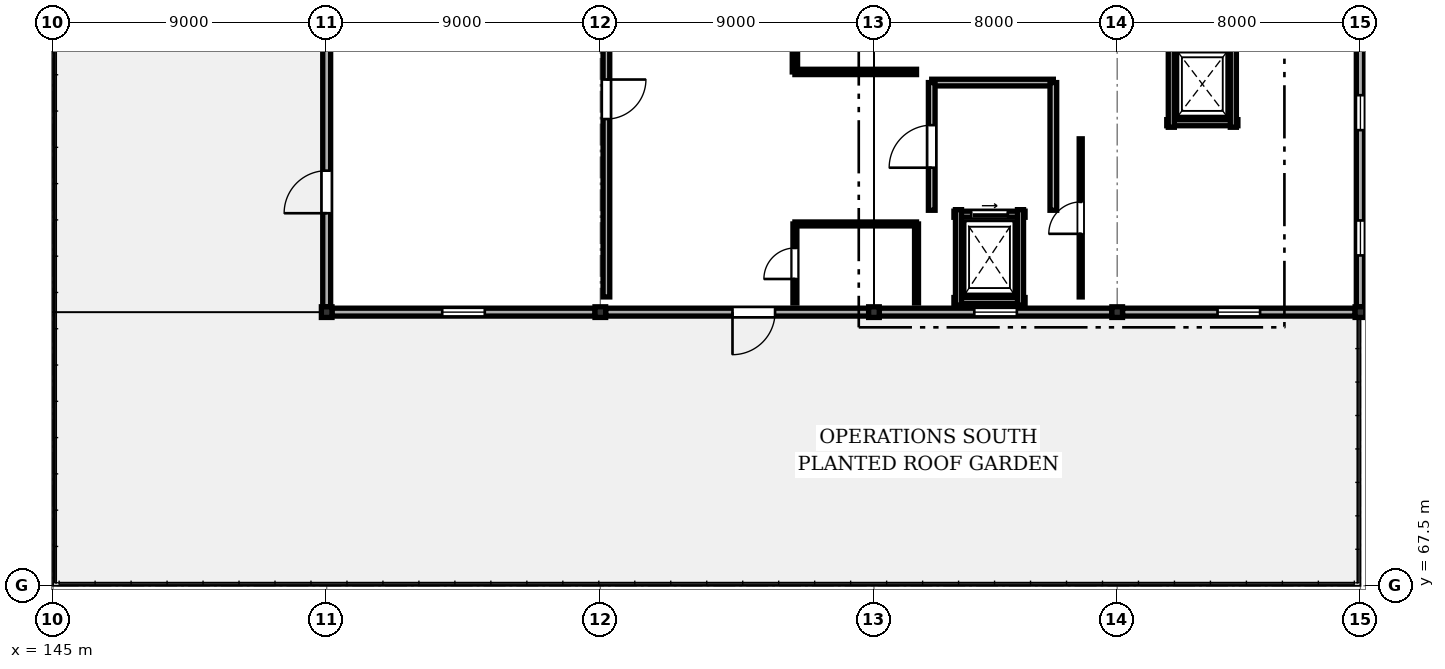
"""IFC4 building model, lengths in metres.
Left out: names, types, materials, properties, quantities, classifications, styles, units other than length and angle.
Written with IfcOpenShell. Run it as: python <this file> out.ifc"""

import sys

from ifc_helpers import new_model, si_unit, direction, frame, frame_2d, origin, origin_2d, place, context, subcontext, project, spatial, rectangle, i_section, extrude, element, fill, save


model = new_model("IFC4")
c1 = context("Model", 3, precision=1e-05, world=origin(), true_north=direction((0.0, 1.0)))
c2 = subcontext(c1, "Body", "Model", "MODEL_VIEW")
j1 = project(units=[si_unit("LENGTHUNIT", "METRE"), si_unit("PLANEANGLEUNIT", "RADIAN")], contexts=[c1])
p1 = place(None, origin())
s1 = spatial("IfcSite", under=j1, at=p1, CompositionType="ELEMENT")
p2 = place(p1, origin())
s2 = spatial("IfcBuilding", under=s1, at=p2, CompositionType="ELEMENT")
p3 = place(p2, frame((0.0, 0.0, 17.6)))
s3 = spatial("IfcBuildingStorey", under=s2, at=p3, CompositionType="ELEMENT", Elevation=17.6)
for number, where, z_axis, x_axis in (
    (1, (154.0, 76.5, 0.0), (0.0, 0.0, 1.0), (1.0, 0.0, 0.0)),
    (2, (163.0, 76.5, 0.0), (0.0, 0.0, 1.0), (1.0, 0.0, 0.0)),
    (3, (172.0, 76.5, 0.0), (0.0, 0.0, 1.0), (1.0, 0.0, 0.0)),
    (4, (180.0, 76.5, 0.0), (0.0, 0.0, 1.0), (1.0, 0.0, 0.0)),
    (5, (188.0, 76.5, 0.0), (0.0, 0.0, 1.0), (1.0, 0.0, 0.0)),
):
    element("IfcColumn", number, at=place(p3, frame(where, z_axis=z_axis, x_axis=x_axis)), inside=s3, PredefinedType="COLUMN", context=c2, shape_type="SweptSolid", body=[
        extrude(i_section(OverallWidth=0.35, OverallDepth=0.35, WebThickness=0.012, FlangeThickness=0.019, FilletRadius=0.02, at=origin_2d()), origin(), (0.0, 0.0, 1.0), 3.2),
    ])
p4 = place(p3, frame((188.0, 85.325, 0.0), z_axis=(0.0, 0.0, 1.0), x_axis=(0.0, -1.0, 0.0)))
e6 = element("IfcWall", 6, at=p4, inside=s3, PredefinedType="SOLIDWALL", context=c2, shape_type="SweptSolid", body=[
    extrude(rectangle(XDim=8.65, YDim=0.27, at=frame_2d((4.325, 0.0))), origin(), (0.0, 0.0, 1.0), 2.495),
])
p5 = place(p4, frame((1.69, 0.0, 0.9)))
e7 = element("IfcOpeningElement", 7, at=p5, cuts=e6, PredefinedType="OPENING", context=c2, shape_type="SweptSolid", body=[
    extrude(rectangle(XDim=1.15, YDim=1.45, at=frame_2d((0.575, 0.725))), frame((0.0, 0.145, 0.0), z_axis=(0.0, -1.0, 0.0), x_axis=(1.0, 0.0, 0.0)), (0.0, 0.0, 1.0), 0.29),
])
p6 = place(p4, frame((5.81, 0.0, 0.9)))
e8 = element("IfcOpeningElement", 8, at=p6, cuts=e6, PredefinedType="OPENING", context=c2, shape_type="SweptSolid", body=[
    extrude(rectangle(XDim=1.15, YDim=1.45, at=frame_2d((0.575, 0.725))), frame((0.0, 0.145, 0.0), z_axis=(0.0, -1.0, 0.0), x_axis=(1.0, 0.0, 0.0)), (0.0, 0.0, 1.0), 0.29),
])
p7 = place(p3, frame((187.825, 76.5, 0.0), z_axis=(0.0, 0.0, 1.0), x_axis=(-1.0, 0.0, 0.0)))
e9 = element("IfcWall", 9, at=p7, inside=s3, PredefinedType="SOLIDWALL", context=c2, shape_type="SweptSolid", body=[
    extrude(rectangle(XDim=7.65, YDim=0.26, at=frame_2d((3.825, 0.0))), origin(), (0.0, 0.0, 1.0), 2.495),
])
p8 = place(p7, frame((3.125, 0.0, 0.75)))
e10 = element("IfcOpeningElement", 10, at=p8, cuts=e9, PredefinedType="OPENING", context=c2, shape_type="SweptSolid", body=[
    extrude(rectangle(XDim=1.4, YDim=1.55, at=frame_2d((0.7, 0.775))), frame((0.0, 0.14, 0.0), z_axis=(0.0, -1.0, 0.0), x_axis=(1.0, 0.0, 0.0)), (0.0, 0.0, 1.0), 0.28),
])
p9 = place(p3, frame((179.825, 76.5, 0.0), z_axis=(0.0, 0.0, 1.0), x_axis=(-1.0, 0.0, 0.0)))
e11 = element("IfcWall", 11, at=p9, inside=s3, PredefinedType="SOLIDWALL", context=c2, shape_type="SweptSolid", body=[
    extrude(rectangle(XDim=7.65, YDim=0.26, at=frame_2d((3.825, 0.0))), origin(), (0.0, 0.0, 1.0), 2.515),
])
p10 = place(p9, frame((3.125, 0.0, 0.75)))
e12 = element("IfcOpeningElement", 12, at=p10, cuts=e11, PredefinedType="OPENING", context=c2, shape_type="SweptSolid", body=[
    extrude(rectangle(XDim=1.4, YDim=1.55, at=frame_2d((0.7, 0.775))), frame((0.0, 0.14, 0.0), z_axis=(0.0, -1.0, 0.0), x_axis=(1.0, 0.0, 0.0)), (0.0, 0.0, 1.0), 0.28),
])
p11 = place(p3, frame((171.825, 76.5, 0.0), z_axis=(0.0, 0.0, 1.0), x_axis=(-1.0, 0.0, 0.0)))
e13 = element("IfcWall", 13, at=p11, inside=s3, PredefinedType="SOLIDWALL", context=c2, shape_type="SweptSolid", body=[
    extrude(rectangle(XDim=8.65, YDim=0.26, at=frame_2d((4.325, 0.0))), origin(), (0.0, 0.0, 1.0), 2.505),
])
p12 = place(p11, frame((3.078, 0.0, 0.0)))
e14 = element("IfcOpeningElement", 14, at=p12, cuts=e13, PredefinedType="OPENING", context=c2, shape_type="SweptSolid", body=[
    extrude(rectangle(XDim=1.4, YDim=2.25, at=frame_2d((0.7, 1.125))), frame((0.0, 0.14, 0.0), z_axis=(0.0, -1.0, 0.0), x_axis=(1.0, 0.0, 0.0)), (0.0, 0.0, 1.0), 0.28),
])
p13 = place(p3, frame((162.825, 76.5, 0.0), z_axis=(0.0, 0.0, 1.0), x_axis=(-1.0, 0.0, 0.0)))
e15 = element("IfcWall", 15, at=p13, inside=s3, PredefinedType="SOLIDWALL", context=c2, shape_type="SweptSolid", body=[
    extrude(rectangle(XDim=8.65, YDim=0.26, at=frame_2d((4.325, 0.0))), origin(), (0.0, 0.0, 1.0), 2.505),
])
p14 = place(p13, frame((3.625, 0.0, 0.75)))
e16 = element("IfcOpeningElement", 16, at=p14, cuts=e15, PredefinedType="OPENING", context=c2, shape_type="SweptSolid", body=[
    extrude(rectangle(XDim=1.4, YDim=1.55, at=frame_2d((0.7, 0.775))), frame((0.0, 0.14, 0.0), z_axis=(0.0, -1.0, 0.0), x_axis=(1.0, 0.0, 0.0)), (0.0, 0.0, 1.0), 0.28),
])
p15 = place(p3, frame((154.0, 76.675, 0.0), z_axis=(0.0, 0.0, 1.0), x_axis=(0.0, 1.0, 0.0)))
e17 = element("IfcWall", 17, at=p15, inside=s3, PredefinedType="SOLIDWALL", context=c2, shape_type="SweptSolid", body=[
    extrude(rectangle(XDim=8.65, YDim=0.26, at=frame_2d((4.325, 0.0))), origin(), (0.0, 0.0, 1.0), 2.505),
])
p16 = place(p15, frame((3.078, 0.0, 0.0)))
e18 = element("IfcOpeningElement", 18, at=p16, cuts=e17, PredefinedType="OPENING", context=c2, shape_type="SweptSolid", body=[
    extrude(rectangle(XDim=1.4, YDim=2.25, at=frame_2d((0.7, 1.125))), frame((0.0, 0.14, 0.0), z_axis=(0.0, -1.0, 0.0), x_axis=(1.0, 0.0, 0.0)), (0.0, 0.0, 1.0), 0.28),
])
p17 = place(p3, frame((174.63, 76.88, 0.0), z_axis=(0.0, 0.0, 1.0), x_axis=(1.0, 0.0, 0.0)))
e19 = element("IfcWall", 19, at=p17, inside=s3, PredefinedType="SOLIDWALL", context=c2, shape_type="SweptSolid", body=[
    extrude(rectangle(XDim=2.34, YDim=0.2, at=frame_2d((1.17, 0.0))), origin(), (0.0, 0.0, 1.0), 2.515),
])
p18 = place(p3, frame((176.97, 79.72, 0.0), z_axis=(0.0, 0.0, 1.0), x_axis=(-1.0, 0.0, 0.0)))
e20 = element("IfcWall", 20, at=p18, inside=s3, PredefinedType="SOLIDWALL", context=c2, shape_type="SweptSolid", body=[
    extrude(rectangle(XDim=2.34, YDim=0.2, at=frame_2d((1.17, 0.0))), origin(), (0.0, 0.0, 1.0), 2.955),
])
p19 = place(p18, frame((0.57, 0.0, 0.0)))
e21 = element("IfcOpeningElement", 21, at=p19, cuts=e20, PredefinedType="OPENING", context=c2, shape_type="SweptSolid", body=[
    extrude(rectangle(XDim=1.2, YDim=2.15, at=frame_2d((0.6, 1.075))), frame((0.0, 0.11, 0.0), z_axis=(0.0, -1.0, 0.0), x_axis=(1.0, 0.0, 0.0)), (0.0, 0.0, 1.0), 0.22),
])
for number, where, z_axis, x_axis in (
    (22, (174.78, 79.87, 0.0), (0.0, 0.0, 1.0), (0.0, -1.0, 0.0)),
    (23, (176.82, 76.73, 0.0), (0.0, 0.0, 1.0), (0.0, 1.0, 0.0)),
):
    element("IfcWall", number, at=place(p3, frame(where, z_axis=z_axis, x_axis=x_axis)), inside=s3, PredefinedType="SOLIDWALL", context=c2, shape_type="SweptSolid", body=[
        extrude(rectangle(XDim=3.14, YDim=0.2, at=frame_2d((1.57, 0.0))), origin(), (0.0, 0.0, 1.0), 2.515),
    ])
p20 = place(p3, frame((181.63, 82.73, 0.0), z_axis=(0.0, 0.0, 1.0), x_axis=(1.0, 0.0, 0.0)))
e24 = element("IfcWall", 24, at=p20, inside=s3, PredefinedType="SOLIDWALL", context=c2, shape_type="SweptSolid", body=[
    extrude(rectangle(XDim=2.34, YDim=0.2, at=frame_2d((1.17, 0.0))), origin(), (0.0, 0.0, 1.0), 2.955),
])
for number, where, z_axis, x_axis in (
    (25, (181.78, 85.42, 0.0), (0.0, 0.0, 1.0), (0.0, -1.0, 0.0)),
    (26, (183.82, 82.58, 0.0), (0.0, 0.0, 1.0), (0.0, 1.0, 0.0)),
):
    element("IfcWall", number, at=place(p3, frame(where, z_axis=z_axis, x_axis=x_axis)), inside=s3, PredefinedType="SOLIDWALL", context=c2, shape_type="SweptSolid", body=[
        extrude(rectangle(XDim=2.84, YDim=0.2, at=frame_2d((1.42, 0.0))), origin(), (0.0, 0.0, 1.0), 2.515),
    ])
p21 = place(p3, frame((163.2, 90.0, 0.0), z_axis=(0.0, 0.0, 1.0), x_axis=(0.0, -1.0, 0.0)))
e27 = element("IfcWall", 27, at=p21, inside=s3, PredefinedType="SOLIDWALL", context=c2, shape_type="SweptSolid", body=[
    extrude(rectangle(XDim=13.0, YDim=0.22, at=frame_2d((6.5, 0.0))), origin(), (0.0, 0.0, 1.0), 2.505),
])
p22 = place(p21, frame((5.85, 0.0, 0.0)))
e28 = element("IfcOpeningElement", 28, at=p22, cuts=e27, PredefinedType="OPENING", context=c2, shape_type="SweptSolid", body=[
    extrude(rectangle(XDim=1.3, YDim=2.1, at=frame_2d((0.65, 1.05))), frame((0.0, 0.12, 0.0), z_axis=(0.0, -1.0, 0.0), x_axis=(1.0, 0.0, 0.0)), (0.0, 0.0, 1.0), 0.24),
])
p23 = place(p3, frame((173.4, 84.4, 0.0), z_axis=(0.0, 0.0, 1.0), x_axis=(-1.0, 0.0, 0.0)))
e29 = element("IfcWall", 29, at=p23, inside=s3, PredefinedType="PARTITIONING", context=c2, shape_type="SweptSolid", body=[
    extrude(rectangle(XDim=4.0, YDim=0.175, at=frame_2d((2.0, 0.0))), origin(), (0.0, 0.0, 1.0), 2.565),
])
p24 = place(p3, frame((169.4, 84.4, 0.0), z_axis=(0.0, 0.0, 1.0), x_axis=(0.0, 1.0, 0.0)))
e30 = element("IfcWall", 30, at=p24, inside=s3, PredefinedType="PARTITIONING", context=c2, shape_type="SweptSolid", body=[
    extrude(rectangle(XDim=11.2, YDim=0.175, at=frame_2d((5.6, 0.0))), origin(), (0.0, 0.0, 1.0), 2.515),
])
p25 = place(p24, frame((5.075, 0.0, 0.0)))
e31 = element("IfcOpeningElement", 31, at=p25, cuts=e30, PredefinedType="OPENING", context=c2, shape_type="SweptSolid", body=[
    extrude(rectangle(XDim=1.05, YDim=2.1, at=frame_2d((0.525, 1.05))), frame((0.0, 0.097, 0.0), z_axis=(0.0, -1.0, 0.0), x_axis=(1.0, 0.0, 0.0)), (0.0, 0.0, 1.0), 0.195),
])
p26 = place(p3, frame((169.4, 79.4, 0.0), z_axis=(0.0, 0.0, 1.0), x_axis=(1.0, 0.0, 0.0)))
e32 = element("IfcWall", 32, at=p26, inside=s3, PredefinedType="PARTITIONING", context=c2, shape_type="SweptSolid", body=[
    extrude(rectangle(XDim=4.0, YDim=0.13, at=frame_2d((2.0, 0.0))), origin(), (0.0, 0.0, 1.0), 2.565),
])
p27 = place(p3, frame((169.4, 76.8, 0.0), z_axis=(0.0, 0.0, 1.0), x_axis=(0.0, 1.0, 0.0)))
e33 = element("IfcWall", 33, at=p27, inside=s3, PredefinedType="PARTITIONING", context=c2, shape_type="SweptSolid", body=[
    extrude(rectangle(XDim=2.6, YDim=0.13, at=frame_2d((1.3, 0.0))), origin(), (0.0, 0.0, 1.0), 2.515),
])
p28 = place(p27, frame((0.79, 0.0, 0.0)))
e34 = element("IfcOpeningElement", 34, at=p28, cuts=e33, PredefinedType="OPENING", context=c2, shape_type="SweptSolid", body=[
    extrude(rectangle(XDim=1.02, YDim=2.05, at=frame_2d((0.51, 1.025))), frame((0.0, 0.075, 0.0), z_axis=(0.0, -1.0, 0.0), x_axis=(1.0, 0.0, 0.0)), (0.0, 0.0, 1.0), 0.15),
])
p29 = place(p3, frame((173.4, 79.4, 0.0), z_axis=(0.0, 0.0, 1.0), x_axis=(0.0, -1.0, 0.0)))
e35 = element("IfcWall", 35, at=p29, inside=s3, PredefinedType="PARTITIONING", context=c2, shape_type="SweptSolid", body=[
    extrude(rectangle(XDim=2.6, YDim=0.13, at=frame_2d((1.3, 0.0))), origin(), (0.0, 0.0, 1.0), 2.515),
])
p30 = place(p3, frame((178.8, 77.0, 0.0), z_axis=(0.0, 0.0, 1.0), x_axis=(0.0, 1.0, 0.0)))
e36 = element("IfcWall", 36, at=p30, inside=s3, PredefinedType="PARTITIONING", context=c2, shape_type="SweptSolid", body=[
    extrude(rectangle(XDim=5.2, YDim=0.1, at=frame_2d((2.6, 0.0))), origin(), (0.0, 0.0, 1.0), 2.515),
])
p31 = place(p30, frame((2.075, 0.0, 0.0)))
e37 = element("IfcOpeningElement", 37, at=p31, cuts=e36, PredefinedType="OPENING", context=c2, shape_type="SweptSolid", body=[
    extrude(rectangle(XDim=1.05, YDim=2.1, at=frame_2d((0.525, 1.05))), frame((0.0, 0.06, 0.0), z_axis=(0.0, -1.0, 0.0), x_axis=(1.0, 0.0, 0.0)), (0.0, 0.0, 1.0), 0.12),
])
p32 = place(p3, frame((173.9, 84.05, 0.0), z_axis=(0.0, 0.0, 1.0), x_axis=(1.0, 0.0, 0.0)))
e38 = element("IfcWall", 38, at=p32, inside=s3, PredefinedType="SOLIDWALL", context=c2, shape_type="SweptSolid", body=[
    extrude(rectangle(XDim=4.0, YDim=0.22, at=frame_2d((2.0, 0.0))), origin(), (0.0, 0.0, 1.0), 2.955),
])
p33 = place(p3, frame((173.9, 79.85, 0.0), z_axis=(0.0, 0.0, 1.0), x_axis=(0.0, 1.0, 0.0)))
e39 = element("IfcWall", 39, at=p33, inside=s3, PredefinedType="SOLIDWALL", context=c2, shape_type="SweptSolid", body=[
    extrude(rectangle(XDim=4.2, YDim=0.22, at=frame_2d((2.1, 0.0))), origin(), (0.0, 0.0, 1.0), 2.955),
])
p34 = place(p33, frame((1.4, 0.0, 0.0)))
e40 = element("IfcOpeningElement", 40, at=p34, cuts=e39, PredefinedType="OPENING", context=c2, shape_type="SweptSolid", body=[
    extrude(rectangle(XDim=1.4, YDim=2.1, at=frame_2d((0.7, 1.05))), frame((0.0, 0.12, 0.0), z_axis=(0.0, -1.0, 0.0), x_axis=(1.0, 0.0, 0.0)), (0.0, 0.0, 1.0), 0.24),
])
p35 = place(p3, frame((177.9, 84.05, 0.0), z_axis=(0.0, 0.0, 1.0), x_axis=(0.0, -1.0, 0.0)))
e41 = element("IfcWall", 41, at=p35, inside=s3, PredefinedType="SOLIDWALL", context=c2, shape_type="SweptSolid", body=[
    extrude(rectangle(XDim=4.2, YDim=0.22, at=frame_2d((2.1, 0.0))), origin(), (0.0, 0.0, 1.0), 2.955),
])
p36 = place(p5, origin())
e42 = element("IfcWindow", 42, at=p36, inside=s3, PartitioningType="SINGLE_PANEL", PredefinedType="WINDOW", context=c2, shape_type="SweptSolid", body=[
    extrude(rectangle(XDim=1.15, YDim=1.45, at=frame_2d((0.575, 0.725))), frame((0.0, 0.03, 0.0), z_axis=(0.0, -1.0, 0.0), x_axis=(1.0, 0.0, 0.0)), (0.0, 0.0, 1.0), 0.06),
])
fill(e7, e42)
p37 = place(p6, origin())
e43 = element("IfcWindow", 43, at=p37, inside=s3, PartitioningType="SINGLE_PANEL", PredefinedType="WINDOW", context=c2, shape_type="SweptSolid", body=[
    extrude(rectangle(XDim=1.15, YDim=1.45, at=frame_2d((0.575, 0.725))), frame((0.0, 0.03, 0.0), z_axis=(0.0, -1.0, 0.0), x_axis=(1.0, 0.0, 0.0)), (0.0, 0.0, 1.0), 0.06),
])
fill(e8, e43)
p38 = place(p8, origin())
e44 = element("IfcWindow", 44, at=p38, inside=s3, PartitioningType="SINGLE_PANEL", PredefinedType="WINDOW", context=c2, shape_type="SweptSolid", body=[
    extrude(rectangle(XDim=1.4, YDim=1.55, at=frame_2d((0.7, 0.775))), frame((0.0, 0.03, 0.0), z_axis=(0.0, -1.0, 0.0), x_axis=(1.0, 0.0, 0.0)), (0.0, 0.0, 1.0), 0.06),
])
fill(e10, e44)
p39 = place(p10, origin())
e45 = element("IfcWindow", 45, at=p39, inside=s3, PartitioningType="SINGLE_PANEL", PredefinedType="WINDOW", context=c2, shape_type="SweptSolid", body=[
    extrude(rectangle(XDim=1.4, YDim=1.55, at=frame_2d((0.7, 0.775))), frame((0.0, 0.03, 0.0), z_axis=(0.0, -1.0, 0.0), x_axis=(1.0, 0.0, 0.0)), (0.0, 0.0, 1.0), 0.06),
])
fill(e12, e45)
p40 = place(p12, origin())
e46 = element("IfcDoor", 46, at=p40, inside=s3, OperationType="SINGLE_SWING_RIGHT", PredefinedType="DOOR", context=c2, shape_type="SweptSolid", body=[
    extrude(rectangle(XDim=1.4, YDim=2.25, at=frame_2d((0.7, 1.125))), frame((0.0, 0.025, 0.0), z_axis=(0.0, -1.0, 0.0), x_axis=(1.0, 0.0, 0.0)), (0.0, 0.0, 1.0), 0.05),
])
fill(e14, e46)
p41 = place(p14, origin())
e47 = element("IfcWindow", 47, at=p41, inside=s3, PartitioningType="SINGLE_PANEL", PredefinedType="WINDOW", context=c2, shape_type="SweptSolid", body=[
    extrude(rectangle(XDim=1.4, YDim=1.55, at=frame_2d((0.7, 0.775))), frame((0.0, 0.03, 0.0), z_axis=(0.0, -1.0, 0.0), x_axis=(1.0, 0.0, 0.0)), (0.0, 0.0, 1.0), 0.06),
])
fill(e16, e47)
p42 = place(p16, origin())
e48 = element("IfcDoor", 48, at=p42, inside=s3, OperationType="SINGLE_SWING_LEFT", PredefinedType="DOOR", context=c2, shape_type="SweptSolid", body=[
    extrude(rectangle(XDim=1.4, YDim=2.25, at=frame_2d((0.7, 1.125))), frame((0.0, 0.025, 0.0), z_axis=(0.0, -1.0, 0.0), x_axis=(1.0, 0.0, 0.0)), (0.0, 0.0, 1.0), 0.05),
])
fill(e18, e48)
p43 = place(p19, origin())
e49 = element("IfcDoor", 49, at=p43, inside=s3, OperationType="SLIDING_TO_LEFT", PredefinedType="DOOR", context=c2, shape_type="SweptSolid", body=[
    extrude(rectangle(XDim=1.2, YDim=2.15, at=frame_2d((0.6, 1.075))), frame((0.0, 0.025, 0.0), z_axis=(0.0, -1.0, 0.0), x_axis=(1.0, 0.0, 0.0)), (0.0, 0.0, 1.0), 0.05),
])
fill(e21, e49)
p44 = place(p22, origin())
e50 = element("IfcDoor", 50, at=p44, inside=s3, OperationType="SINGLE_SWING_LEFT", PredefinedType="DOOR", context=c2, shape_type="SweptSolid", body=[
    extrude(rectangle(XDim=1.3, YDim=2.1, at=frame_2d((0.65, 1.05))), frame((0.0, 0.025, 0.0), z_axis=(0.0, -1.0, 0.0), x_axis=(1.0, 0.0, 0.0)), (0.0, 0.0, 1.0), 0.05),
])
fill(e28, e50)
p45 = place(p28, origin())
e51 = element("IfcDoor", 51, at=p45, inside=s3, OperationType="SINGLE_SWING_LEFT", PredefinedType="DOOR", context=c2, shape_type="SweptSolid", body=[
    extrude(rectangle(XDim=1.02, YDim=2.05, at=frame_2d((0.51, 1.025))), frame((0.0, 0.025, 0.0), z_axis=(0.0, -1.0, 0.0), x_axis=(1.0, 0.0, 0.0)), (0.0, 0.0, 1.0), 0.05),
])
fill(e34, e51)
p46 = place(p31, origin())
e52 = element("IfcDoor", 52, at=p46, inside=s3, OperationType="SINGLE_SWING_LEFT", PredefinedType="DOOR", context=c2, shape_type="SweptSolid", body=[
    extrude(rectangle(XDim=1.05, YDim=2.1, at=frame_2d((0.525, 1.05))), frame((0.0, 0.025, 0.0), z_axis=(0.0, -1.0, 0.0), x_axis=(1.0, 0.0, 0.0)), (0.0, 0.0, 1.0), 0.05),
])
fill(e37, e52)
p47 = place(p34, origin())
e53 = element("IfcDoor", 53, at=p47, inside=s3, OperationType="SINGLE_SWING_LEFT", PredefinedType="DOOR", context=c2, shape_type="SweptSolid", body=[
    extrude(rectangle(XDim=1.4, YDim=2.1, at=frame_2d((0.7, 1.05))), frame((0.0, 0.025, 0.0), z_axis=(0.0, -1.0, 0.0), x_axis=(1.0, 0.0, 0.0)), (0.0, 0.0, 1.0), 0.05),
])
fill(e40, e53)
save(model, sys.argv[1])
